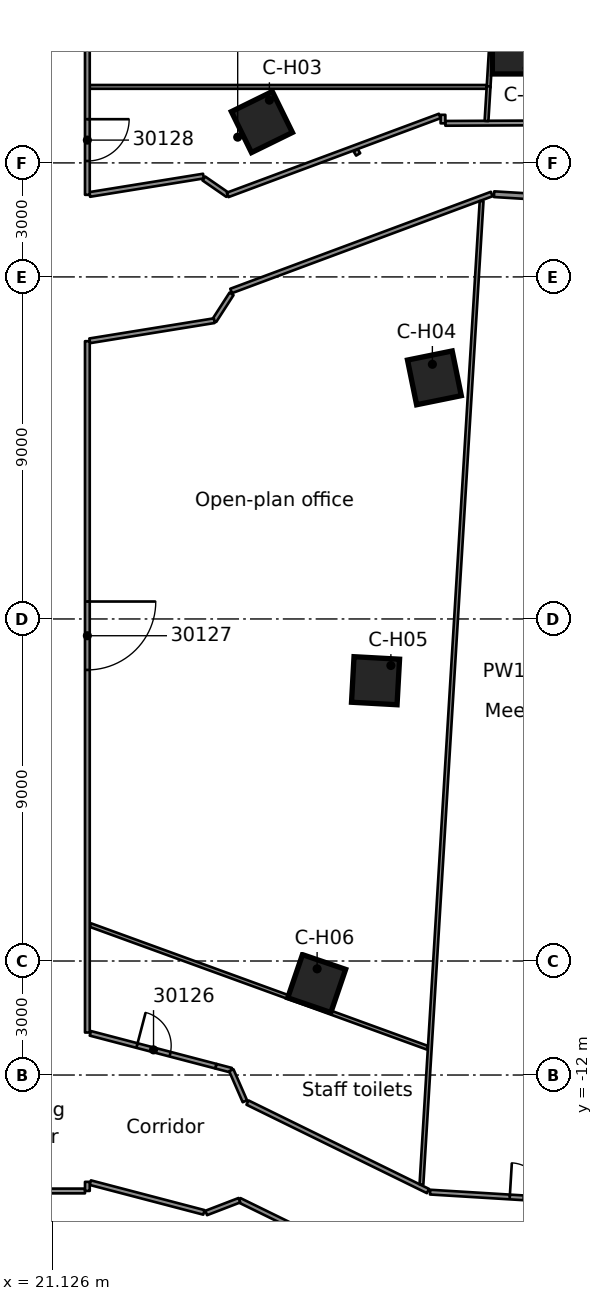
"""IFC4 building model, lengths in metres.
Left out: names, types, materials, properties, quantities, classifications, styles, units other than length and angle.
Written with IfcOpenShell. Run it as: python <this file> out.ifc"""

import sys

from ifc_helpers import new_model, si_unit, direction, frame, frame_2d, origin, origin_2d, place, context, subcontext, project, spatial, rectangle, extrude, element, fill, save


model = new_model("IFC4")
c1 = context("Model", 3, precision=1e-05, world=origin(), true_north=direction((0.0, 1.0)))
c2 = subcontext(c1, "Body", "Model", "MODEL_VIEW")
j1 = project(units=[si_unit("LENGTHUNIT", "METRE"), si_unit("PLANEANGLEUNIT", "RADIAN")], contexts=[c1])
p1 = place(None, origin())
s1 = spatial("IfcSite", under=j1, at=p1, CompositionType="ELEMENT")
p2 = place(p1, origin())
s2 = spatial("IfcBuilding", under=s1, at=p2, CompositionType="ELEMENT")
p3 = place(p2, frame((0.0, 0.0, 152.6)))
s3 = spatial("IfcBuildingStorey", under=s2, at=p3, CompositionType="ELEMENT", Elevation=152.6)
p4 = place(p3, frame((33.258, 14.79, 0.0), z_axis=(0.0, 0.0, 1.0), x_axis=(1.0, 0.0, 0.0)))
e1 = element("IfcColumn", 1, at=p4, inside=s3, PredefinedType="COLUMN", context=c2, shape_type="SweptSolid", body=[
    extrude(rectangle(XDim=1.1, YDim=0.9, at=origin_2d()), origin(), (0.0, 0.0, 1.0), 3.5),
])
for number, where, z_axis, x_axis in (
    (2, (26.644, 13.075, 0.0), (0.0, 0.0, 1.0), (0.898, 0.441, 0.0)),
    (3, (31.183, 6.344, 0.0), (0.0, 0.0, 1.0), (0.98, 0.199, 0.0)),
    (4, (29.634, -1.625, 0.0), (0.0, 0.0, 1.0), (0.998, -0.055, 0.0)),
    (5, (28.085, -9.594, 0.0), (0.0, 0.0, 1.0), (0.946, -0.323, 0.0)),
):
    element("IfcColumn", number, at=place(p3, frame(where, z_axis=z_axis, x_axis=x_axis)), inside=s3, PredefinedType="COLUMN", context=c2, shape_type="SweptSolid", body=[
        extrude(rectangle(XDim=1.2, YDim=1.2, at=origin_2d()), origin(), (0.0, 0.0, 1.0), 3.5),
    ])
p5 = place(p3, frame((25.845, 8.555, 0.0), z_axis=(0.0, 0.0, 1.0), x_axis=(-0.541888467868, -0.84045040805, 0.0)))
e6 = element("IfcWall", 6, at=p5, inside=s3, PredefinedType="PARTITIONING", context=c2, shape_type="SweptSolid", body=[
    extrude(rectangle(XDim=0.84, YDim=0.125, at=frame_2d((0.42, 0.0))), origin(), (0.0, 0.0, 1.0), 3.08),
])
p6 = place(p3, frame((25.115, 11.591, 0.0), z_axis=(0.0, 0.0, 1.0), x_axis=(0.822768476523, -0.568376665636, 0.0)))
e7 = element("IfcWall", 7, at=p6, inside=s3, PredefinedType="PARTITIONING", context=c2, shape_type="SweptSolid", body=[
    extrude(rectangle(XDim=0.762, YDim=0.125, at=frame_2d((0.381, 0.0))), origin(), (0.0, 0.0, 1.0), 3.08),
])
p7 = place(p3, frame((29.112, 12.332, 0.0), z_axis=(0.0, 0.0, 1.0), x_axis=(0.515635582666, -0.856807998264, 0.0)))
e8 = element("IfcWall", 8, at=p7, inside=s3, PredefinedType="PARTITIONING", context=c2, shape_type="SweptSolid", body=[
    extrude(rectangle(XDim=0.126, YDim=0.125, at=frame_2d((0.063, 0.0))), origin(), (0.0, 0.0, 1.0), 3.08),
])
p8 = place(p3, frame((26.052, -15.294, 0.0), z_axis=(0.0, 0.0, 1.0), x_axis=(0.898165349965, -0.43965782618, 0.0)))
e9 = element("IfcWall", 9, at=p8, inside=s3, PredefinedType="PARTITIONING", context=c2, shape_type="SweptSolid", body=[
    extrude(rectangle(XDim=4.831, YDim=0.125, at=frame_2d((2.416, 0.0))), origin(), (0.0, 0.0, 1.0), 3.08),
])
p9 = place(p3, frame((31.014, -15.053, 0.0), z_axis=(0.0, 0.0, 1.0), x_axis=(-0.897926088568, 0.440146270538, 0.0)))
e10 = element("IfcWall", 10, at=p9, inside=s3, PredefinedType="PARTITIONING", context=c2, shape_type="SweptSolid", body=[
    extrude(rectangle(XDim=5.289, YDim=0.125, at=frame_2d((2.645, 0.0))), origin(), (0.0, 0.0, 1.0), 3.08),
])
p10 = place(p3, frame((22.131, -8.055, 0.0), z_axis=(0.0, 0.0, 1.0), x_axis=(0.939701226618, -0.341996498071, 0.0)))
e11 = element("IfcWall", 11, at=p10, inside=s3, PredefinedType="PARTITIONING", context=c2, shape_type="SweptSolid", body=[
    extrude(rectangle(XDim=9.436, YDim=0.1, at=frame_2d((4.718, 0.0))), origin(), (0.0, 0.0, 1.0), 3.08),
])
p11 = place(p3, frame((22.129, -14.832, 0.0), z_axis=(0.0, 0.0, 1.0), x_axis=(0.967419716648, -0.25317798451, 0.0)))
e12 = element("IfcWall", 12, at=p11, inside=s3, PredefinedType="PARTITIONING", context=c2, shape_type="SweptSolid", body=[
    extrude(rectangle(XDim=3.089, YDim=0.125, at=frame_2d((1.544, 0.0))), origin(), (0.0, 0.0, 1.0), 3.08),
])
p12 = place(p3, frame((22.129, -10.903, 0.0), z_axis=(0.0, 0.0, 1.0), x_axis=(0.967418911518, -0.253181060977, 0.0)))
e13 = element("IfcWall", 13, at=p12, inside=s3, PredefinedType="PARTITIONING", context=c2, shape_type="SweptSolid", body=[
    extrude(rectangle(XDim=3.417, YDim=0.125, at=frame_2d((1.708, 0.0))), origin(), (0.0, 0.0, 1.0), 3.08),
])
p13 = place(p12, frame((1.269, 0.0, 0.0)))
e14 = element("IfcOpeningElement", 14, at=p13, cuts=e13, PredefinedType="OPENING", context=c2, shape_type="SweptSolid", body=[
    extrude(rectangle(XDim=0.9, YDim=2.1, at=frame_2d((0.45, 1.05))), frame((0.0, 0.073, 0.0), z_axis=(0.0, -1.0, 0.0), x_axis=(1.0, 0.0, 0.0)), (0.0, 0.0, 1.0), 0.145),
])
p14 = place(p3, frame((25.435, -11.768, 0.0), z_axis=(0.0, 0.0, 1.0), x_axis=(0.967293731239, -0.253658899914, 0.0)))
e15 = element("IfcWall", 15, at=p14, inside=s3, PredefinedType="PARTITIONING", context=c2, shape_type="SweptSolid", body=[
    extrude(rectangle(XDim=0.418, YDim=0.125, at=frame_2d((0.209, 0.0))), origin(), (0.0, 0.0, 1.0), 3.08),
])
p15 = place(p3, frame((31.07, -15.081, 0.0), z_axis=(0.0, 0.0, 1.0), x_axis=(0.998141754277, -0.060934705778, 0.0)))
e16 = element("IfcWall", 16, at=p15, inside=s3, PredefinedType="PARTITIONING", context=c2, shape_type="SweptSolid", body=[
    extrude(rectangle(XDim=9.992, YDim=0.125, at=frame_2d((4.996, 0.0))), origin(), (0.0, 0.0, 1.0), 3.08),
])
p16 = place(p15, frame((2.1, 0.0, 0.0)))
e17 = element("IfcOpeningElement", 17, at=p16, cuts=e16, PredefinedType="OPENING", context=c2, shape_type="SweptSolid", body=[
    extrude(rectangle(XDim=0.9, YDim=2.1, at=frame_2d((0.45, 1.05))), frame((0.0, 0.073, 0.0), z_axis=(0.0, -1.0, 0.0), x_axis=(1.0, 0.0, 0.0)), (0.0, 0.0, 1.0), 0.145),
])
p17 = place(p3, frame((44.145, 10.481, 0.0), z_axis=(0.0, 0.0, 1.0), x_axis=(-0.998138667877, 0.06098524157, 0.0)))
e18 = element("IfcWall", 18, at=p17, inside=s3, PredefinedType="PARTITIONING", context=c2, shape_type="SweptSolid", body=[
    extrude(rectangle(XDim=11.413, YDim=0.15, at=frame_2d((5.707, 0.0))), origin(), (0.0, 0.0, 1.0), 3.08),
])
p18 = place(p17, frame((8.558, 0.0, 0.0)))
e19 = element("IfcOpeningElement", 19, at=p18, cuts=e18, PredefinedType="OPENING", context=c2, shape_type="SweptSolid", body=[
    extrude(rectangle(XDim=0.9, YDim=2.1, at=frame_2d((0.45, 1.05))), frame((0.0, 0.085, 0.0), z_axis=(0.0, -1.0, 0.0), x_axis=(1.0, 0.0, 0.0)), (0.0, 0.0, 1.0), 0.17),
])
p19 = place(p17, frame((3.523, 0.0, 0.0)))
e20 = element("IfcOpeningElement", 20, at=p19, cuts=e18, PredefinedType="OPENING", context=c2, shape_type="SweptSolid", body=[
    extrude(rectangle(XDim=0.9, YDim=2.1, at=frame_2d((0.45, 1.05))), frame((0.0, 0.085, 0.0), z_axis=(0.0, -1.0, 0.0), x_axis=(1.0, 0.0, 0.0)), (0.0, 0.0, 1.0), 0.17),
])
p20 = place(p3, frame((21.988, -15.051, 0.0), z_axis=(0.0, 0.0, 1.0), x_axis=(-1.0, 0.0, 0.0)))
e21 = element("IfcWall", 21, at=p20, inside=s3, PredefinedType="PARTITIONING", context=c2, shape_type="SweptSolid", body=[
    extrude(rectangle(XDim=10.997, YDim=0.125, at=frame_2d((5.499, 0.0))), origin(), (0.0, 0.0, 1.0), 3.08),
])
p21 = place(p20, frame((4.538, 0.0, 0.0)))
e22 = element("IfcOpeningElement", 22, at=p21, cuts=e21, PredefinedType="OPENING", context=c2, shape_type="SweptSolid", body=[
    extrude(rectangle(XDim=1.8, YDim=2.1, at=frame_2d((0.9, 1.05))), frame((0.0, 0.073, 0.0), z_axis=(0.0, -1.0, 0.0), x_axis=(1.0, 0.0, 0.0)), (0.0, 0.0, 1.0), 0.145),
])
p22 = place(p3, frame((31.471, 13.041, 0.0), z_axis=(0.0, 0.0, 1.0), x_axis=(0.999990255084, 0.004414718129, 0.0)))
e23 = element("IfcWall", 23, at=p22, inside=s3, PredefinedType="PARTITIONING", context=c2, shape_type="SweptSolid", body=[
    extrude(rectangle(XDim=8.627, YDim=0.125, at=frame_2d((4.313, 0.0))), origin(), (0.0, 0.0, 1.0), 3.08),
])
p23 = place(p3, frame((22.113, 14.0, 0.0), z_axis=(0.0, 0.0, 1.0), x_axis=(1.0, 0.0, 0.0)))
e24 = element("IfcWall", 24, at=p23, inside=s3, PredefinedType="PARTITIONING", context=c2, shape_type="SweptSolid", body=[
    extrude(rectangle(XDim=10.446, YDim=0.1, at=frame_2d((5.223, 0.0))), origin(), (0.0, 0.0, 1.0), 3.08),
])
p24 = place(p3, frame((25.39, 7.849, 0.0), z_axis=(0.0, 0.0, 1.0), x_axis=(-0.987169785664, -0.159674087668, 0.0)))
e25 = element("IfcWall", 25, at=p24, inside=s3, PredefinedType="PARTITIONING", context=c2, shape_type="SweptSolid", body=[
    extrude(rectangle(XDim=3.319, YDim=0.125, at=frame_2d((1.66, 0.0))), origin(), (0.0, 0.0, 1.0), 3.08),
])
p25 = place(p3, frame((22.113, 11.17, 0.0), z_axis=(0.0, 0.0, 1.0), x_axis=(0.987210874087, 0.159419854738, 0.0)))
e26 = element("IfcWall", 26, at=p25, inside=s3, PredefinedType="PARTITIONING", context=c2, shape_type="SweptSolid", body=[
    extrude(rectangle(XDim=3.031, YDim=0.125, at=frame_2d((1.515, 0.0))), origin(), (0.0, 0.0, 1.0), 3.08),
])
p26 = place(p3, frame((25.833, 8.63, 0.0), z_axis=(0.0, 0.0, 1.0), x_axis=(0.93725557741, 0.348643059037, 0.0)))
e27 = element("IfcWall", 27, at=p26, inside=s3, PredefinedType="PARTITIONING", context=c2, shape_type="SweptSolid", body=[
    extrude(rectangle(XDim=7.317, YDim=0.125, at=frame_2d((3.658, 0.0))), origin(), (0.0, 0.0, 1.0), 3.08),
])
p27 = place(p3, frame((25.742, 11.158, 0.0), z_axis=(0.0, 0.0, 1.0), x_axis=(0.937195672542, 0.348804058705, 0.0)))
e28 = element("IfcWall", 28, at=p27, inside=s3, PredefinedType="PARTITIONING", context=c2, shape_type="SweptSolid", body=[
    extrude(rectangle(XDim=5.955, YDim=0.125, at=frame_2d((2.978, 0.0))), origin(), (0.0, 0.0, 1.0), 3.08),
])
p28 = place(p3, frame((26.196, -12.691, 0.0), z_axis=(0.0, 0.0, 1.0), x_axis=(-0.400387792065, 0.916345794973, 0.0)))
e29 = element("IfcWall", 29, at=p28, inside=s3, PredefinedType="PARTITIONING", context=c2, shape_type="SweptSolid", body=[
    extrude(rectangle(XDim=0.891, YDim=0.125, at=frame_2d((0.446, 0.0))), origin(), (0.0, 0.0, 1.0), 3.08),
])
p29 = place(p3, frame((25.178, -15.63, 0.0), z_axis=(0.0, 0.0, 1.0), x_axis=(0.933426221906, 0.358769408196, 0.0)))
e30 = element("IfcWall", 30, at=p29, inside=s3, PredefinedType="PARTITIONING", context=c2, shape_type="SweptSolid", body=[
    extrude(rectangle(XDim=0.936, YDim=0.125, at=frame_2d((0.468, 0.0))), origin(), (0.0, 0.0, 1.0), 3.08),
])
p30 = place(p3, frame((30.842, -14.879, 0.0), z_axis=(0.0, 0.0, 1.0), x_axis=(0.061072336712, 0.998133342639, 0.0)))
e31 = element("IfcWall", 31, at=p30, inside=s3, PredefinedType="PARTITIONING", context=c2, shape_type="SweptSolid", body=[
    extrude(rectangle(XDim=25.92, YDim=0.1, at=frame_2d((12.96, 0.0))), origin(), (0.0, 0.0, 1.0), 3.08),
])
p31 = place(p3, frame((32.608, 13.985, 0.0), z_axis=(0.0, 0.0, 1.0), x_axis=(0.060978462691, 0.998139082036, 0.0)))
e32 = element("IfcWall", 32, at=p31, inside=s3, PredefinedType="PARTITIONING", context=c2, shape_type="SweptSolid", body=[
    extrude(rectangle(XDim=4.3, YDim=0.1, at=frame_2d((2.15, 0.0))), origin(), (0.0, 0.0, 1.0), 3.08),
])
p32 = place(p3, frame((32.554, 13.103, 0.0), z_axis=(0.0, 0.0, 1.0), x_axis=(0.061463226288, 0.998109348626, 0.0)))
e33 = element("IfcWall", 33, at=p32, inside=s3, PredefinedType="PARTITIONING", context=c2, shape_type="SweptSolid", body=[
    extrude(rectangle(XDim=0.914, YDim=0.1, at=frame_2d((0.457, 0.0))), origin(), (0.0, 0.0, 1.0), 3.08),
])
p33 = place(p3, frame((31.409, 13.041, 0.0), z_axis=(0.0, 0.0, 1.0), x_axis=(0.0, 1.0, 0.0)))
e34 = element("IfcWall", 34, at=p33, inside=s3, PredefinedType="PARTITIONING", context=c2, shape_type="SweptSolid", body=[
    extrude(rectangle(XDim=0.224, YDim=0.125, at=frame_2d((0.112, 0.0))), origin(), (0.0, 0.0, 1.0), 3.08),
])
p34 = place(p3, frame((22.051, -15.05, 0.0), z_axis=(0.0, 0.0, 1.0), x_axis=(0.0, 1.0, 0.0)))
e35 = element("IfcWall", 35, at=p34, inside=s3, PredefinedType="PARTITIONING", context=c2, shape_type="SweptSolid", body=[
    extrude(rectangle(XDim=0.239, YDim=0.125, at=frame_2d((0.12, 0.0))), origin(), (0.0, 0.0, 1.0), 3.08),
])
p35 = place(p3, frame((22.051, 7.309, 0.0), z_axis=(0.0, 0.0, 1.0), x_axis=(0.0, -1.0, 0.0)))
e36 = element("IfcWall", 36, at=p35, inside=s3, PredefinedType="PARTITIONING", context=c2, shape_type="SweptSolid", body=[
    extrude(rectangle(XDim=18.191, YDim=0.125, at=frame_2d((9.096, 0.0))), origin(), (0.0, 0.0, 1.0), 3.08),
])
p36 = place(p35, frame((6.85, 0.0, 0.0)))
e37 = element("IfcOpeningElement", 37, at=p36, cuts=e36, PredefinedType="OPENING", context=c2, shape_type="SweptSolid", body=[
    extrude(rectangle(XDim=1.8, YDim=2.1, at=frame_2d((0.9, 1.05))), frame((0.0, 0.073, 0.0), z_axis=(0.0, -1.0, 0.0), x_axis=(1.0, 0.0, 0.0)), (0.0, 0.0, 1.0), 0.145),
])
p37 = place(p3, frame((22.051, 15.05, 0.0), z_axis=(0.0, 0.0, 1.0), x_axis=(0.0, -1.0, 0.0)))
e38 = element("IfcWall", 38, at=p37, inside=s3, PredefinedType="PARTITIONING", context=c2, shape_type="SweptSolid", body=[
    extrude(rectangle(XDim=3.89, YDim=0.125, at=frame_2d((1.945, 0.0))), origin(), (0.0, 0.0, 1.0), 3.08),
])
p38 = place(p37, frame((1.9, 0.0, 0.0)))
e39 = element("IfcOpeningElement", 39, at=p38, cuts=e38, PredefinedType="OPENING", context=c2, shape_type="SweptSolid", body=[
    extrude(rectangle(XDim=1.1, YDim=2.1, at=frame_2d((0.55, 1.05))), frame((0.0, 0.073, 0.0), z_axis=(0.0, -1.0, 0.0), x_axis=(1.0, 0.0, 0.0)), (0.0, 0.0, 1.0), 0.145),
])
p39 = place(p16, origin())
e40 = element("IfcDoor", 40, at=p39, inside=s3, OperationType="SINGLE_SWING_LEFT", PredefinedType="DOOR", context=c2, shape_type="SweptSolid", body=[
    extrude(rectangle(XDim=0.9, YDim=2.1, at=frame_2d((0.45, 1.05))), frame((0.0, 0.025, 0.0), z_axis=(0.0, -1.0, 0.0), x_axis=(1.0, 0.0, 0.0)), (0.0, 0.0, 1.0), 0.05),
])
fill(e17, e40)
p40 = place(p13, origin())
e41 = element("IfcDoor", 41, at=p40, inside=s3, OperationType="SINGLE_SWING_RIGHT", PredefinedType="DOOR", context=c2, shape_type="SweptSolid", body=[
    extrude(rectangle(XDim=0.9, YDim=2.1, at=frame_2d((0.45, 1.05))), frame((0.0, 0.025, 0.0), z_axis=(0.0, -1.0, 0.0), x_axis=(1.0, 0.0, 0.0)), (0.0, 0.0, 1.0), 0.05),
])
fill(e14, e41)
p41 = place(p36, origin())
e42 = element("IfcDoor", 42, at=p41, inside=s3, OperationType="DOUBLE_DOOR_SINGLE_SWING", PredefinedType="DOOR", context=c2, shape_type="SweptSolid", body=[
    extrude(rectangle(XDim=1.8, YDim=2.1, at=frame_2d((0.9, 1.05))), frame((0.0, 0.025, 0.0), z_axis=(0.0, -1.0, 0.0), x_axis=(1.0, 0.0, 0.0)), (0.0, 0.0, 1.0), 0.05),
])
fill(e37, e42)
p42 = place(p38, origin())
e43 = element("IfcDoor", 43, at=p42, inside=s3, OperationType="SINGLE_SWING_RIGHT", PredefinedType="DOOR", context=c2, shape_type="SweptSolid", body=[
    extrude(rectangle(XDim=1.1, YDim=2.1, at=frame_2d((0.55, 1.05))), frame((0.0, 0.025, 0.0), z_axis=(0.0, -1.0, 0.0), x_axis=(1.0, 0.0, 0.0)), (0.0, 0.0, 1.0), 0.05),
])
fill(e39, e43)
save(model, sys.argv[1])
